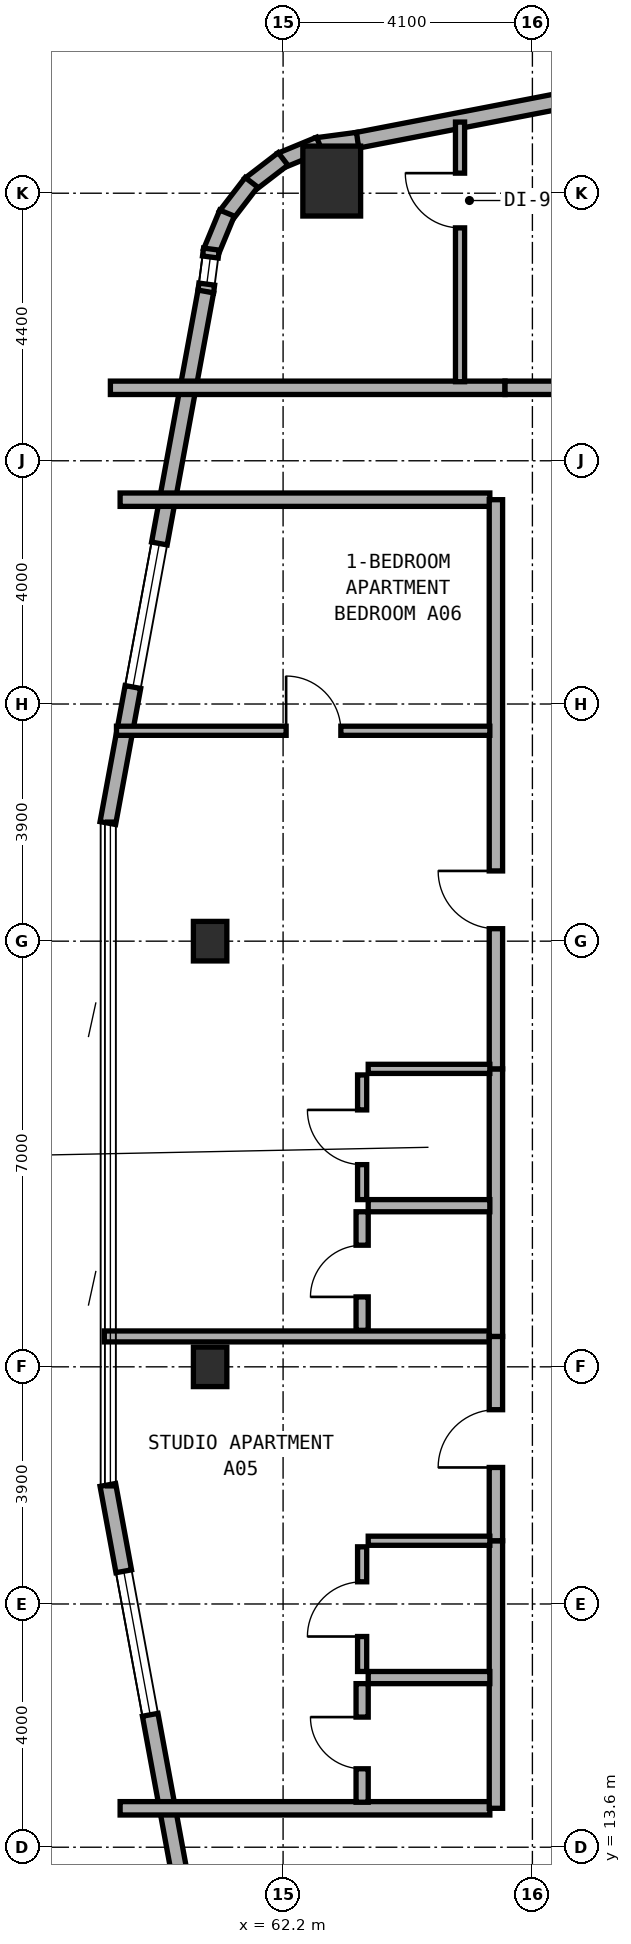
"""IFC4 building model, lengths in metres.
Left out: names, types, materials, properties, quantities, classifications, styles, units other than length and angle.
Written with IfcOpenShell. Run it as: python <this file> out.ifc"""

import sys

from ifc_helpers import new_model, si_unit, direction, frame, frame_2d, origin, origin_2d, place, context, subcontext, project, spatial, rectangle, extrude, element, fill, save


model = new_model("IFC4")
c1 = context("Model", 3, precision=1e-05, world=origin(), true_north=direction((0.0, 1.0)))
c2 = subcontext(c1, "Body", "Model", "MODEL_VIEW")
j1 = project(units=[si_unit("LENGTHUNIT", "METRE"), si_unit("PLANEANGLEUNIT", "RADIAN")], contexts=[c1])
p1 = place(None, origin())
s1 = spatial("IfcSite", under=j1, at=p1, CompositionType="ELEMENT")
p2 = place(p1, origin())
s2 = spatial("IfcBuilding", under=s1, at=p2, CompositionType="ELEMENT")
p3 = place(p2, frame((0.0, 0.0, 116.0)))
s3 = spatial("IfcBuildingStorey", under=s2, at=p3, CompositionType="ELEMENT", Elevation=116.0)
for number, where, z_axis, x_axis in (
    (1, (61.0, 21.5, 0.0), (0.0, 0.0, 1.0), (1.0, 0.0, 0.0)),
    (2, (61.0, 28.5, 0.0), (0.0, 0.0, 1.0), (1.0, 0.0, 0.0)),
):
    element("IfcColumn", number, at=place(p3, frame(where, z_axis=z_axis, x_axis=x_axis)), inside=s3, PredefinedType="COLUMN", context=c2, shape_type="SweptSolid", body=[
        extrude(rectangle(XDim=0.55, YDim=0.65, at=origin_2d()), origin(), (0.0, 0.0, 1.0), 3.5),
    ])
p4 = place(p3, frame((63.0, 41.0, 0.0), z_axis=(0.0, 0.0, 1.0), x_axis=(1.0, 0.0, 0.0)))
e3 = element("IfcColumn", 3, at=p4, inside=s3, PredefinedType="COLUMN", context=c2, shape_type="SweptSolid", body=[
    extrude(rectangle(XDim=0.95, YDim=1.15, at=origin_2d()), origin(), (0.0, 0.0, 1.0), 3.5),
])
p5 = place(p3, frame((71.739, 43.282, 0.0), z_axis=(0.0, 0.0, 1.0), x_axis=(-0.981750199588, -0.190175039396, 0.0)))
e4 = element("IfcWall", 4, at=p5, inside=s3, PredefinedType="STANDARD", context=c2, shape_type="SweptSolid", body=[
    extrude(rectangle(XDim=8.477, YDim=0.26, at=frame_2d((4.238, 0.0))), origin(), (0.0, 0.0, 1.0), 3.18),
])
p6 = place(p5, frame((2.139, 0.0, 0.8)))
e5 = element("IfcOpeningElement", 5, at=p6, cuts=e4, PredefinedType="OPENING", context=c2, shape_type="SweptSolid", body=[
    extrude(rectangle(XDim=2.4, YDim=1.6, at=frame_2d((1.2, 0.8))), frame((0.0, 0.14, 0.0), z_axis=(0.0, -1.0, 0.0), x_axis=(1.0, 0.0, 0.0)), (0.0, 0.0, 1.0), 0.28),
])
p7 = place(p3, frame((63.425, 41.672, 0.0), z_axis=(0.0, 0.0, 1.0), x_axis=(-0.991300187529, -0.13162043232, 0.0)))
e6 = element("IfcWall", 6, at=p7, inside=s3, PredefinedType="STANDARD", context=c2, shape_type="SweptSolid", body=[
    extrude(rectangle(XDim=0.677, YDim=0.26, at=frame_2d((0.338, 0.0))), origin(), (0.0, 0.0, 1.0), 3.18),
])
for number, where, z_axis, x_axis in (
    (7, (62.8, 41.601, 0.0), (0.0, 0.0, 1.0), (-0.924, -0.382, 0.0)),
    (8, (62.199, 41.364, 0.0), (0.0, 0.0, 1.0), (-0.793, -0.61, 0.0)),
    (9, (61.68, 40.979, 0.0), (0.0, 0.0, 1.0), (-0.609, -0.793, 0.0)),
):
    element("IfcWall", number, at=place(p3, frame(where, z_axis=z_axis, x_axis=x_axis)), inside=s3, PredefinedType="STANDARD", context=c2, shape_type="SweptSolid", body=[
        extrude(rectangle(XDim=0.694, YDim=0.26, at=frame_2d((0.347, 0.0))), origin(), (0.0, 0.0, 1.0), 3.18),
    ])
p8 = place(p3, frame((61.278, 40.473, 0.0), z_axis=(0.0, 0.0, 1.0), x_axis=(-0.382289608286, -0.924042561464, 0.0)))
e10 = element("IfcWall", 10, at=p8, inside=s3, PredefinedType="STANDARD", context=c2, shape_type="SweptSolid", body=[
    extrude(rectangle(XDim=0.694, YDim=0.26, at=frame_2d((0.347, 0.0))), origin(), (0.0, 0.0, 1.0), 3.18),
])
p9 = place(p3, frame((61.021, 39.881, 0.0), z_axis=(0.0, 0.0, 1.0), x_axis=(-0.130614135366, -0.991433279471, 0.0)))
e11 = element("IfcWall", 11, at=p9, inside=s3, PredefinedType="STANDARD", context=c2, shape_type="SweptSolid", body=[
    extrude(rectangle(XDim=0.712, YDim=0.26, at=frame_2d((0.356, 0.0))), origin(), (0.0, 0.0, 1.0), 3.18),
])
p10 = place(p9, frame((0.131, 0.0, 0.85)))
e12 = element("IfcOpeningElement", 12, at=p10, cuts=e11, PredefinedType="OPENING", context=c2, shape_type="SweptSolid", body=[
    extrude(rectangle(XDim=0.45, YDim=1.5, at=frame_2d((0.225, 0.75))), frame((0.0, 0.14, 0.0), z_axis=(0.0, -1.0, 0.0), x_axis=(1.0, 0.0, 0.0)), (0.0, 0.0, 1.0), 0.28),
])
p11 = place(p3, frame((60.929, 39.184, 0.0), z_axis=(0.0, 0.0, 1.0), x_axis=(-0.181209963057, -0.983444431215, 0.0)))
e13 = element("IfcWall", 13, at=p11, inside=s3, PredefinedType="STANDARD", context=c2, shape_type="SweptSolid", body=[
    extrude(rectangle(XDim=8.889, YDim=0.26, at=frame_2d((4.445, 0.0))), origin(), (0.0, 0.0, 1.0), 3.18),
])
p12 = place(p11, frame((4.214, 0.0, 0.8)))
e14 = element("IfcOpeningElement", 14, at=p12, cuts=e13, PredefinedType="OPENING", context=c2, shape_type="SweptSolid", body=[
    extrude(rectangle(XDim=2.4, YDim=1.6, at=frame_2d((1.2, 0.8))), frame((0.0, 0.14, 0.0), z_axis=(0.0, -1.0, 0.0), x_axis=(1.0, 0.0, 0.0)), (0.0, 0.0, 1.0), 0.28),
])
p13 = place(p3, frame((59.318, 19.558, 0.0), z_axis=(0.0, 0.0, 1.0), x_axis=(0.181209963057, -0.983444431215, 0.0)))
e15 = element("IfcWall", 15, at=p13, inside=s3, PredefinedType="STANDARD", context=c2, shape_type="SweptSolid", body=[
    extrude(rectangle(XDim=8.889, YDim=0.26, at=frame_2d((4.445, 0.0))), origin(), (0.0, 0.0, 1.0), 3.18),
])
p14 = place(p13, frame((1.444, 0.0, 0.8)))
e16 = element("IfcOpeningElement", 16, at=p14, cuts=e15, PredefinedType="OPENING", context=c2, shape_type="SweptSolid", body=[
    extrude(rectangle(XDim=2.4, YDim=1.6, at=frame_2d((1.2, 0.8))), frame((0.0, 0.14, 0.0), z_axis=(0.0, -1.0, 0.0), x_axis=(1.0, 0.0, 0.0)), (0.0, 0.0, 1.0), 0.28),
])
p15 = place(p3, frame((59.36, 37.6, 0.0), z_axis=(0.0, 0.0, 1.0), x_axis=(1.0, 0.0, 0.0)))
e17 = element("IfcWall", 17, at=p15, inside=s3, PredefinedType="SOLIDWALL", context=c2, shape_type="SweptSolid", body=[
    extrude(rectangle(XDim=6.49, YDim=0.22, at=frame_2d((3.245, 0.0))), origin(), (0.0, 0.0, 1.0), 2.875),
])
p16 = place(p3, frame((65.85, 37.6, 0.0), z_axis=(0.0, 0.0, 1.0), x_axis=(1.0, 0.0, 0.0)))
e18 = element("IfcWall", 18, at=p16, inside=s3, PredefinedType="SOLIDWALL", context=c2, shape_type="SweptSolid", body=[
    extrude(rectangle(XDim=8.87, YDim=0.22, at=frame_2d((4.435, 0.0))), origin(), (0.0, 0.0, 1.0), 2.755),
])
p17 = place(p16, frame((3.96, 0.0, 0.0)))
e19 = element("IfcOpeningElement", 19, at=p17, cuts=e18, PredefinedType="OPENING", context=c2, shape_type="SweptSolid", body=[
    extrude(rectangle(XDim=0.95, YDim=2.1, at=frame_2d((0.475, 1.05))), frame((0.0, 0.12, 0.0), z_axis=(0.0, -1.0, 0.0), x_axis=(1.0, 0.0, 0.0)), (0.0, 0.0, 1.0), 0.24),
])
p18 = place(p3, frame((65.11, 37.7, 0.0), z_axis=(0.0, 0.0, 1.0), x_axis=(0.0, 1.0, 0.0)))
e20 = element("IfcWall", 20, at=p18, inside=s3, PredefinedType="PARTITIONING", context=c2, shape_type="SweptSolid", body=[
    extrude(rectangle(XDim=4.27, YDim=0.15, at=frame_2d((2.135, 0.0))), origin(), (0.0, 0.0, 1.0), 2.875),
])
p19 = place(p18, frame((2.53, 0.0, 0.0)))
e21 = element("IfcOpeningElement", 21, at=p19, cuts=e20, PredefinedType="OPENING", context=c2, shape_type="SweptSolid", body=[
    extrude(rectangle(XDim=0.9, YDim=2.1, at=frame_2d((0.45, 1.05))), frame((0.0, 0.085, 0.0), z_axis=(0.0, -1.0, 0.0), x_axis=(1.0, 0.0, 0.0)), (0.0, 0.0, 1.0), 0.17),
])
for number, where, z_axis, x_axis in (
    (22, (59.52, 14.24, 0.0), (0.0, 0.0, 1.0), (1.0, 0.0, 0.0)),
    (23, (59.52, 35.76, 0.0), (0.0, 0.0, 1.0), (1.0, 0.0, 0.0)),
):
    element("IfcWall", number, at=place(p3, frame(where, z_axis=z_axis, x_axis=x_axis)), inside=s3, PredefinedType="SOLIDWALL", context=c2, shape_type="SweptSolid", body=[
        extrude(rectangle(XDim=6.08, YDim=0.22, at=frame_2d((3.04, 0.0))), origin(), (0.0, 0.0, 1.0), 2.875),
    ])
p20 = place(p3, frame((59.26, 22.0, 0.0), z_axis=(0.0, 0.0, 1.0), x_axis=(1.0, 0.0, 0.0)))
e24 = element("IfcWall", 24, at=p20, inside=s3, PredefinedType="SOLIDWALL", context=c2, shape_type="SweptSolid", body=[
    extrude(rectangle(XDim=6.44, YDim=0.18, at=frame_2d((3.22, 0.0))), origin(), (0.0, 0.0, 1.0), 2.875),
])
p21 = place(p3, frame((65.7, 14.24, 0.0), z_axis=(0.0, 0.0, 1.0), x_axis=(0.0, 1.0, 0.0)))
e25 = element("IfcWall", 25, at=p21, inside=s3, PredefinedType="SOLIDWALL", context=c2, shape_type="SweptSolid", body=[
    extrude(rectangle(XDim=4.4, YDim=0.22, at=frame_2d((2.2, 0.0))), origin(), (0.0, 0.0, 1.0), 3.18),
])
p22 = place(p3, frame((65.7, 18.64, 0.0), z_axis=(0.0, 0.0, 1.0), x_axis=(0.0, 1.0, 0.0)))
e26 = element("IfcWall", 26, at=p22, inside=s3, PredefinedType="SOLIDWALL", context=c2, shape_type="SweptSolid", body=[
    extrude(rectangle(XDim=3.36, YDim=0.22, at=frame_2d((1.68, 0.0))), origin(), (0.0, 0.0, 1.0), 2.755),
])
p23 = place(p22, frame((1.205, 0.0, 0.0)))
e27 = element("IfcOpeningElement", 27, at=p23, cuts=e26, PredefinedType="OPENING", context=c2, shape_type="SweptSolid", body=[
    extrude(rectangle(XDim=0.95, YDim=2.1, at=frame_2d((0.475, 1.05))), frame((0.0, 0.12, 0.0), z_axis=(0.0, -1.0, 0.0), x_axis=(1.0, 0.0, 0.0)), (0.0, 0.0, 1.0), 0.24),
])
p24 = place(p3, frame((63.6, 16.39, 0.0), z_axis=(0.0, 0.0, 1.0), x_axis=(1.0, 0.0, 0.0)))
e28 = element("IfcWall", 28, at=p24, inside=s3, PredefinedType="PLUMBINGWALL", context=c2, shape_type="SweptSolid", body=[
    extrude(rectangle(XDim=2.0, YDim=0.2, at=frame_2d((1.0, 0.0))), origin(), (0.0, 0.0, 1.0), 3.18),
])
p25 = place(p3, frame((63.6, 18.64, 0.0), z_axis=(0.0, 0.0, 1.0), x_axis=(1.0, 0.0, 0.0)))
e29 = element("IfcWall", 29, at=p25, inside=s3, PredefinedType="PARTITIONING", context=c2, shape_type="SweptSolid", body=[
    extrude(rectangle(XDim=2.0, YDim=0.15, at=frame_2d((1.0, 0.0))), origin(), (0.0, 0.0, 1.0), 3.18),
])
p26 = place(p3, frame((63.5, 14.34, 0.0), z_axis=(0.0, 0.0, 1.0), x_axis=(0.0, 1.0, 0.0)))
e30 = element("IfcWall", 30, at=p26, inside=s3, PredefinedType="PLUMBINGWALL", context=c2, shape_type="SweptSolid", body=[
    extrude(rectangle(XDim=1.95, YDim=0.2, at=frame_2d((0.975, 0.0))), origin(), (0.0, 0.0, 1.0), 3.18),
])
p27 = place(p26, frame((0.55, 0.0, 0.0)))
e31 = element("IfcOpeningElement", 31, at=p27, cuts=e30, PredefinedType="OPENING", context=c2, shape_type="SweptSolid", body=[
    extrude(rectangle(XDim=0.85, YDim=2.1, at=frame_2d((0.425, 1.05))), frame((0.0, 0.11, 0.0), z_axis=(0.0, -1.0, 0.0), x_axis=(1.0, 0.0, 0.0)), (0.0, 0.0, 1.0), 0.22),
])
p28 = place(p3, frame((63.5, 16.49, 0.0), z_axis=(0.0, 0.0, 1.0), x_axis=(0.0, 1.0, 0.0)))
e32 = element("IfcWall", 32, at=p28, inside=s3, PredefinedType="PARTITIONING", context=c2, shape_type="SweptSolid", body=[
    extrude(rectangle(XDim=2.05, YDim=0.15, at=frame_2d((1.025, 0.0))), origin(), (0.0, 0.0, 1.0), 3.18),
])
p29 = place(p28, frame((0.575, 0.0, 0.0)))
e33 = element("IfcOpeningElement", 33, at=p29, cuts=e32, PredefinedType="OPENING", context=c2, shape_type="SweptSolid", body=[
    extrude(rectangle(XDim=0.9, YDim=2.1, at=frame_2d((0.45, 1.05))), frame((0.0, 0.085, 0.0), z_axis=(0.0, -1.0, 0.0), x_axis=(1.0, 0.0, 0.0)), (0.0, 0.0, 1.0), 0.17),
])
p30 = place(p3, frame((65.7, 22.0, 0.0), z_axis=(0.0, 0.0, 1.0), x_axis=(0.0, 1.0, 0.0)))
e34 = element("IfcWall", 34, at=p30, inside=s3, PredefinedType="SOLIDWALL", context=c2, shape_type="SweptSolid", body=[
    extrude(rectangle(XDim=4.4, YDim=0.22, at=frame_2d((2.2, 0.0))), origin(), (0.0, 0.0, 1.0), 3.18),
])
p31 = place(p3, frame((65.7, 26.4, 0.0), z_axis=(0.0, 0.0, 1.0), x_axis=(0.0, 1.0, 0.0)))
e35 = element("IfcWall", 35, at=p31, inside=s3, PredefinedType="SOLIDWALL", context=c2, shape_type="SweptSolid", body=[
    extrude(rectangle(XDim=9.36, YDim=0.22, at=frame_2d((4.68, 0.0))), origin(), (0.0, 0.0, 1.0), 2.755),
])
p32 = place(p31, frame((2.305, 0.0, 0.0)))
e36 = element("IfcOpeningElement", 36, at=p32, cuts=e35, PredefinedType="OPENING", context=c2, shape_type="SweptSolid", body=[
    extrude(rectangle(XDim=0.95, YDim=2.1, at=frame_2d((0.475, 1.05))), frame((0.0, 0.12, 0.0), z_axis=(0.0, -1.0, 0.0), x_axis=(1.0, 0.0, 0.0)), (0.0, 0.0, 1.0), 0.24),
])
p33 = place(p3, frame((59.46, 31.96, 0.0), z_axis=(0.0, 0.0, 1.0), x_axis=(1.0, 0.0, 0.0)))
e37 = element("IfcWall", 37, at=p33, inside=s3, PredefinedType="PARTITIONING", context=c2, shape_type="SweptSolid", body=[
    extrude(rectangle(XDim=6.14, YDim=0.15, at=frame_2d((3.07, 0.0))), origin(), (0.0, 0.0, 1.0), 2.875),
])
p34 = place(p33, frame((2.79, 0.0, 0.0)))
e38 = element("IfcOpeningElement", 38, at=p34, cuts=e37, PredefinedType="OPENING", context=c2, shape_type="SweptSolid", body=[
    extrude(rectangle(XDim=0.9, YDim=2.1, at=frame_2d((0.45, 1.05))), frame((0.0, 0.085, 0.0), z_axis=(0.0, -1.0, 0.0), x_axis=(1.0, 0.0, 0.0)), (0.0, 0.0, 1.0), 0.17),
])
p35 = place(p3, frame((63.6, 24.15, 0.0), z_axis=(0.0, 0.0, 1.0), x_axis=(1.0, 0.0, 0.0)))
e39 = element("IfcWall", 39, at=p35, inside=s3, PredefinedType="PLUMBINGWALL", context=c2, shape_type="SweptSolid", body=[
    extrude(rectangle(XDim=2.0, YDim=0.2, at=frame_2d((1.0, 0.0))), origin(), (0.0, 0.0, 1.0), 3.18),
])
p36 = place(p3, frame((63.6, 26.4, 0.0), z_axis=(0.0, 0.0, 1.0), x_axis=(1.0, 0.0, 0.0)))
e40 = element("IfcWall", 40, at=p36, inside=s3, PredefinedType="PARTITIONING", context=c2, shape_type="SweptSolid", body=[
    extrude(rectangle(XDim=2.0, YDim=0.15, at=frame_2d((1.0, 0.0))), origin(), (0.0, 0.0, 1.0), 3.18),
])
p37 = place(p3, frame((63.5, 22.1, 0.0), z_axis=(0.0, 0.0, 1.0), x_axis=(0.0, 1.0, 0.0)))
e41 = element("IfcWall", 41, at=p37, inside=s3, PredefinedType="PLUMBINGWALL", context=c2, shape_type="SweptSolid", body=[
    extrude(rectangle(XDim=1.95, YDim=0.2, at=frame_2d((0.975, 0.0))), origin(), (0.0, 0.0, 1.0), 3.18),
])
p38 = place(p37, frame((0.55, 0.0, 0.0)))
e42 = element("IfcOpeningElement", 42, at=p38, cuts=e41, PredefinedType="OPENING", context=c2, shape_type="SweptSolid", body=[
    extrude(rectangle(XDim=0.85, YDim=2.1, at=frame_2d((0.425, 1.05))), frame((0.0, 0.11, 0.0), z_axis=(0.0, -1.0, 0.0), x_axis=(1.0, 0.0, 0.0)), (0.0, 0.0, 1.0), 0.22),
])
p39 = place(p3, frame((63.5, 24.25, 0.0), z_axis=(0.0, 0.0, 1.0), x_axis=(0.0, 1.0, 0.0)))
e43 = element("IfcWall", 43, at=p39, inside=s3, PredefinedType="PARTITIONING", context=c2, shape_type="SweptSolid", body=[
    extrude(rectangle(XDim=2.05, YDim=0.15, at=frame_2d((1.025, 0.0))), origin(), (0.0, 0.0, 1.0), 3.18),
])
p40 = place(p39, frame((0.575, 0.0, 0.0)))
e44 = element("IfcOpeningElement", 44, at=p40, cuts=e43, PredefinedType="OPENING", context=c2, shape_type="SweptSolid", body=[
    extrude(rectangle(XDim=0.9, YDim=2.1, at=frame_2d((0.45, 1.05))), frame((0.0, 0.085, 0.0), z_axis=(0.0, -1.0, 0.0), x_axis=(1.0, 0.0, 0.0)), (0.0, 0.0, 1.0), 0.17),
])
p41 = place(p12, origin())
e45 = element("IfcWindow", 45, at=p41, inside=s3, PartitioningType="SINGLE_PANEL", PredefinedType="WINDOW", context=c2, shape_type="SweptSolid", body=[
    extrude(rectangle(XDim=2.4, YDim=1.6, at=frame_2d((1.2, 0.8))), frame((0.0, 0.03, 0.0), z_axis=(0.0, -1.0, 0.0), x_axis=(1.0, 0.0, 0.0)), (0.0, 0.0, 1.0), 0.06),
])
fill(e14, e45)
p42 = place(p14, origin())
e46 = element("IfcWindow", 46, at=p42, inside=s3, PartitioningType="SINGLE_PANEL", PredefinedType="WINDOW", context=c2, shape_type="SweptSolid", body=[
    extrude(rectangle(XDim=2.4, YDim=1.6, at=frame_2d((1.2, 0.8))), frame((0.0, 0.03, 0.0), z_axis=(0.0, -1.0, 0.0), x_axis=(1.0, 0.0, 0.0)), (0.0, 0.0, 1.0), 0.06),
])
fill(e16, e46)
p43 = place(p10, origin())
e47 = element("IfcWindow", 47, at=p43, inside=s3, PartitioningType="SINGLE_PANEL", PredefinedType="WINDOW", context=c2, shape_type="SweptSolid", body=[
    extrude(rectangle(XDim=0.45, YDim=1.5, at=frame_2d((0.225, 0.75))), frame((0.0, 0.03, 0.0), z_axis=(0.0, -1.0, 0.0), x_axis=(1.0, 0.0, 0.0)), (0.0, 0.0, 1.0), 0.06),
])
fill(e12, e47)
p44 = place(p19, origin())
e48 = element("IfcDoor", 48, at=p44, inside=s3, OperationType="SINGLE_SWING_RIGHT", PredefinedType="DOOR", context=c2, shape_type="SweptSolid", body=[
    extrude(rectangle(XDim=0.9, YDim=2.1, at=frame_2d((0.45, 1.05))), frame((0.0, 0.025, 0.0), z_axis=(0.0, -1.0, 0.0), x_axis=(1.0, 0.0, 0.0)), (0.0, 0.0, 1.0), 0.05),
])
fill(e21, e48)
p45 = place(p23, origin())
e49 = element("IfcDoor", 49, at=p45, inside=s3, OperationType="SINGLE_SWING_LEFT", PredefinedType="DOOR", context=c2, shape_type="SweptSolid", body=[
    extrude(rectangle(XDim=0.95, YDim=2.1, at=frame_2d((0.475, 1.05))), frame((0.0, 0.025, 0.0), z_axis=(0.0, -1.0, 0.0), x_axis=(1.0, 0.0, 0.0)), (0.0, 0.0, 1.0), 0.05),
])
fill(e27, e49)
p46 = place(p27, origin())
e50 = element("IfcDoor", 50, at=p46, inside=s3, OperationType="SINGLE_SWING_RIGHT", PredefinedType="DOOR", context=c2, shape_type="SweptSolid", body=[
    extrude(rectangle(XDim=0.85, YDim=2.1, at=frame_2d((0.425, 1.05))), frame((0.0, 0.025, 0.0), z_axis=(0.0, -1.0, 0.0), x_axis=(1.0, 0.0, 0.0)), (0.0, 0.0, 1.0), 0.05),
])
fill(e31, e50)
p47 = place(p29, origin())
e51 = element("IfcDoor", 51, at=p47, inside=s3, OperationType="SINGLE_SWING_LEFT", PredefinedType="DOOR", context=c2, shape_type="SweptSolid", body=[
    extrude(rectangle(XDim=0.9, YDim=2.1, at=frame_2d((0.45, 1.05))), frame((0.0, 0.025, 0.0), z_axis=(0.0, -1.0, 0.0), x_axis=(1.0, 0.0, 0.0)), (0.0, 0.0, 1.0), 0.05),
])
fill(e33, e51)
p48 = place(p32, origin())
e52 = element("IfcDoor", 52, at=p48, inside=s3, OperationType="SINGLE_SWING_RIGHT", PredefinedType="DOOR", context=c2, shape_type="SweptSolid", body=[
    extrude(rectangle(XDim=0.95, YDim=2.1, at=frame_2d((0.475, 1.05))), frame((0.0, 0.025, 0.0), z_axis=(0.0, -1.0, 0.0), x_axis=(1.0, 0.0, 0.0)), (0.0, 0.0, 1.0), 0.05),
])
fill(e36, e52)
p49 = place(p34, origin())
e53 = element("IfcDoor", 53, at=p49, inside=s3, OperationType="SINGLE_SWING_LEFT", PredefinedType="DOOR", context=c2, shape_type="SweptSolid", body=[
    extrude(rectangle(XDim=0.9, YDim=2.1, at=frame_2d((0.45, 1.05))), frame((0.0, 0.025, 0.0), z_axis=(0.0, -1.0, 0.0), x_axis=(1.0, 0.0, 0.0)), (0.0, 0.0, 1.0), 0.05),
])
fill(e38, e53)
p50 = place(p38, origin())
e54 = element("IfcDoor", 54, at=p50, inside=s3, OperationType="SINGLE_SWING_LEFT", PredefinedType="DOOR", context=c2, shape_type="SweptSolid", body=[
    extrude(rectangle(XDim=0.85, YDim=2.1, at=frame_2d((0.425, 1.05))), frame((0.0, 0.025, 0.0), z_axis=(0.0, -1.0, 0.0), x_axis=(1.0, 0.0, 0.0)), (0.0, 0.0, 1.0), 0.05),
])
fill(e42, e54)
p51 = place(p40, origin())
e55 = element("IfcDoor", 55, at=p51, inside=s3, OperationType="SINGLE_SWING_RIGHT", PredefinedType="DOOR", context=c2, shape_type="SweptSolid", body=[
    extrude(rectangle(XDim=0.9, YDim=2.1, at=frame_2d((0.45, 1.05))), frame((0.0, 0.025, 0.0), z_axis=(0.0, -1.0, 0.0), x_axis=(1.0, 0.0, 0.0)), (0.0, 0.0, 1.0), 0.05),
])
fill(e44, e55)
save(model, sys.argv[1])
